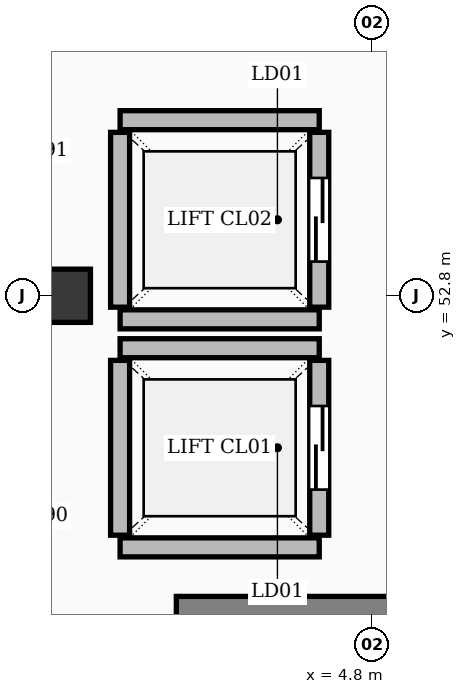
"""IFC4 building model, lengths in metres.
Left out: names, types, materials, properties, quantities, classifications, styles, units other than length and angle.
Written with IfcOpenShell. Run it as: python <this file> out.ifc"""

import sys

from ifc_helpers import new_model, si_unit, direction, frame, frame_2d, origin, origin_2d, place, context, subcontext, project, spatial, rectangle, extrude, element, fill, save


model = new_model("IFC4")
c1 = context("Model", 3, precision=1e-05, world=origin(), true_north=direction((0.0, 1.0)))
c2 = subcontext(c1, "Body", "Model", "MODEL_VIEW")
j1 = project(units=[si_unit("LENGTHUNIT", "METRE"), si_unit("PLANEANGLEUNIT", "RADIAN")], contexts=[c1])
p1 = place(None, origin())
s1 = spatial("IfcSite", under=j1, at=p1, CompositionType="ELEMENT")
p2 = place(p1, origin())
s2 = spatial("IfcBuilding", under=s1, at=p2, CompositionType="ELEMENT")
p3 = place(p2, frame((0.0, 0.0, 16.2)))
s3 = spatial("IfcBuildingStorey", under=s2, at=p3, CompositionType="ELEMENT", Elevation=16.2)
p4 = place(p3, frame((0.75, 52.8, 0.0), z_axis=(0.0, 0.0, 1.0), x_axis=(1.0, 0.0, 0.0)))
e1 = element("IfcColumn", 1, at=p4, inside=s3, PredefinedType="COLUMN", context=c2, shape_type="SweptSolid", body=[
    extrude(rectangle(XDim=0.7, YDim=0.7, at=origin_2d()), origin(), (0.0, 0.0, 1.0), 4.8),
])
p5 = place(p3, frame((2.23, 48.62, 0.0), z_axis=(0.0, 0.0, 1.0), x_axis=(1.0, 0.0, 0.0)))
e2 = element("IfcWall", 2, at=p5, inside=s3, PredefinedType="SHEAR", context=c2, shape_type="SweptSolid", body=[
    extrude(rectangle(XDim=5.15, YDim=0.45, at=frame_2d((2.575, 0.0))), origin(), (0.0, 0.0, 1.0), 4.54),
])
for number, where, z_axis, x_axis in (
    (3, (1.49, 49.49, 0.0), (0.0, 0.0, 1.0), (1.0, 0.0, 0.0)),
    (4, (1.49, 52.11, 0.0), (0.0, 0.0, 1.0), (1.0, 0.0, 0.0)),
):
    element("IfcWall", number, at=place(p3, frame(where, z_axis=z_axis, x_axis=x_axis)), inside=s3, PredefinedType="SOLIDWALL", context=c2, shape_type="SweptSolid", body=[
        extrude(rectangle(XDim=2.62, YDim=0.25, at=frame_2d((1.31, 0.0))), origin(), (0.0, 0.0, 1.0), 4.54),
    ])
p6 = place(p3, frame((1.49, 49.65, 0.0), z_axis=(0.0, 0.0, 1.0), x_axis=(0.0, 1.0, 0.0)))
e5 = element("IfcWall", 5, at=p6, inside=s3, PredefinedType="SOLIDWALL", context=c2, shape_type="SweptSolid", body=[
    extrude(rectangle(XDim=2.3, YDim=0.25, at=frame_2d((1.15, 0.0))), origin(), (0.0, 0.0, 1.0), 4.54),
])
p7 = place(p3, frame((4.11, 49.65, 0.0), z_axis=(0.0, 0.0, 1.0), x_axis=(0.0, 1.0, 0.0)))
e6 = element("IfcWall", 6, at=p7, inside=s3, PredefinedType="SOLIDWALL", context=c2, shape_type="SweptSolid", body=[
    extrude(rectangle(XDim=2.3, YDim=0.25, at=frame_2d((1.15, 0.0))), origin(), (0.0, 0.0, 1.0), 4.54),
])
p8 = place(p7, frame((0.6, 0.0, 0.0)))
e7 = element("IfcOpeningElement", 7, at=p8, cuts=e6, PredefinedType="OPENING", context=c2, shape_type="SweptSolid", body=[
    extrude(rectangle(XDim=1.1, YDim=2.2, at=frame_2d((0.55, 1.1))), frame((0.0, 0.137, 0.0), z_axis=(0.0, -1.0, 0.0), x_axis=(1.0, 0.0, 0.0)), (0.0, 0.0, 1.0), 0.274),
])
for number, where, z_axis, x_axis in (
    (8, (1.49, 52.49, 0.0), (0.0, 0.0, 1.0), (1.0, 0.0, 0.0)),
    (9, (1.49, 55.11, 0.0), (0.0, 0.0, 1.0), (1.0, 0.0, 0.0)),
):
    element("IfcWall", number, at=place(p3, frame(where, z_axis=z_axis, x_axis=x_axis)), inside=s3, PredefinedType="SOLIDWALL", context=c2, shape_type="SweptSolid", body=[
        extrude(rectangle(XDim=2.62, YDim=0.25, at=frame_2d((1.31, 0.0))), origin(), (0.0, 0.0, 1.0), 4.54),
    ])
p9 = place(p3, frame((1.49, 52.65, 0.0), z_axis=(0.0, 0.0, 1.0), x_axis=(0.0, 1.0, 0.0)))
e10 = element("IfcWall", 10, at=p9, inside=s3, PredefinedType="SOLIDWALL", context=c2, shape_type="SweptSolid", body=[
    extrude(rectangle(XDim=2.3, YDim=0.25, at=frame_2d((1.15, 0.0))), origin(), (0.0, 0.0, 1.0), 4.54),
])
p10 = place(p3, frame((4.11, 52.65, 0.0), z_axis=(0.0, 0.0, 1.0), x_axis=(0.0, 1.0, 0.0)))
e11 = element("IfcWall", 11, at=p10, inside=s3, PredefinedType="SOLIDWALL", context=c2, shape_type="SweptSolid", body=[
    extrude(rectangle(XDim=2.3, YDim=0.25, at=frame_2d((1.15, 0.0))), origin(), (0.0, 0.0, 1.0), 4.54),
])
p11 = place(p10, frame((0.6, 0.0, 0.0)))
e12 = element("IfcOpeningElement", 12, at=p11, cuts=e11, PredefinedType="OPENING", context=c2, shape_type="SweptSolid", body=[
    extrude(rectangle(XDim=1.1, YDim=2.2, at=frame_2d((0.55, 1.1))), frame((0.0, 0.137, 0.0), z_axis=(0.0, -1.0, 0.0), x_axis=(1.0, 0.0, 0.0)), (0.0, 0.0, 1.0), 0.274),
])
p12 = place(p8, origin())
e13 = element("IfcDoor", 13, at=p12, inside=s3, OperationType="SLIDING_TO_LEFT", PredefinedType="DOOR", context=c2, shape_type="SweptSolid", body=[
    extrude(rectangle(XDim=1.1, YDim=2.2, at=frame_2d((0.55, 1.1))), frame((0.0, 0.025, 0.0), z_axis=(0.0, -1.0, 0.0), x_axis=(1.0, 0.0, 0.0)), (0.0, 0.0, 1.0), 0.05),
])
fill(e7, e13)
p13 = place(p11, origin())
e14 = element("IfcDoor", 14, at=p13, inside=s3, OperationType="SLIDING_TO_LEFT", PredefinedType="DOOR", context=c2, shape_type="SweptSolid", body=[
    extrude(rectangle(XDim=1.1, YDim=2.2, at=frame_2d((0.55, 1.1))), frame((0.0, 0.025, 0.0), z_axis=(0.0, -1.0, 0.0), x_axis=(1.0, 0.0, 0.0)), (0.0, 0.0, 1.0), 0.05),
])
fill(e12, e14)
save(model, sys.argv[1])
